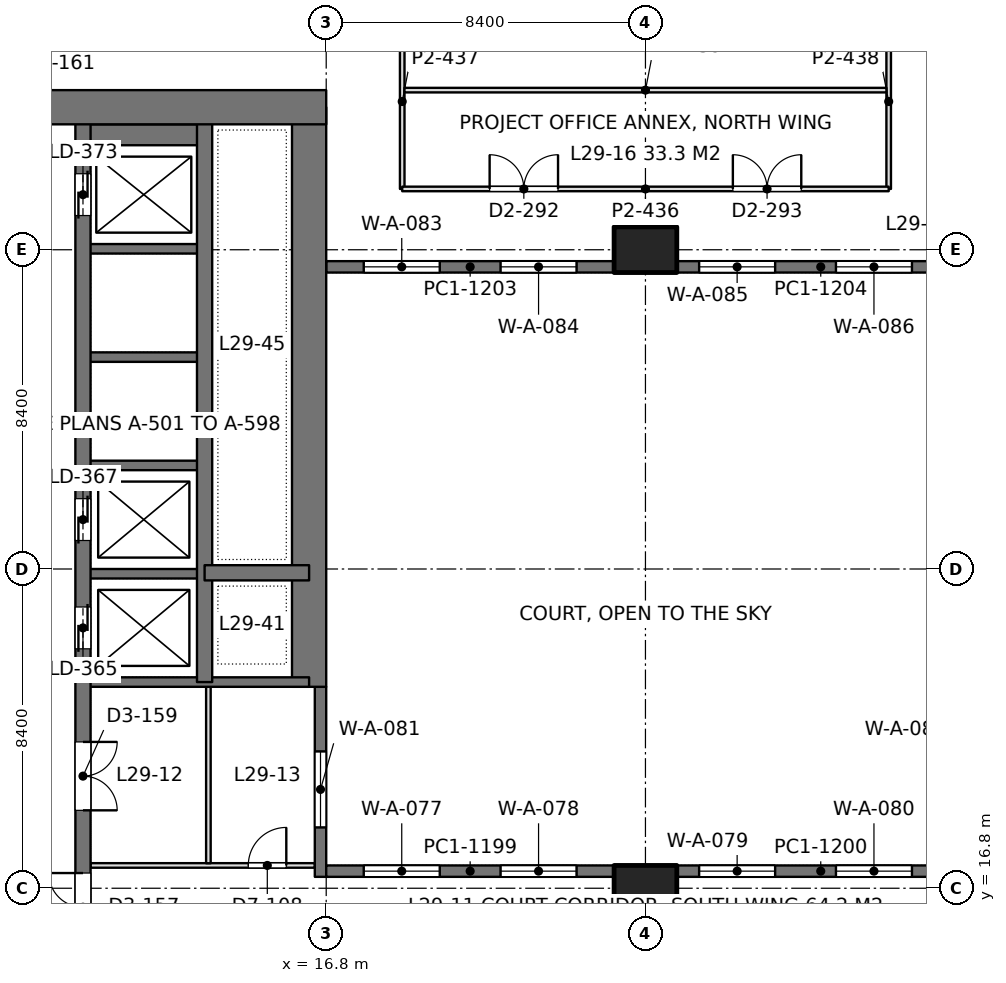
"""IFC4 building model, lengths in metres.
Left out: names, types, materials, properties, quantities, classifications, styles, units other than length and angle.
Written with IfcOpenShell. Run it as: python <this file> out.ifc"""

import sys

from ifc_helpers import new_model, si_unit, direction, frame, frame_2d, origin, origin_2d, place, context, subcontext, project, spatial, rectangle, extrude, element, fill, save


model = new_model("IFC4")
c1 = context("Model", 3, precision=1e-05, world=origin(), true_north=direction((0.0, 1.0)))
c2 = subcontext(c1, "Body", "Model", "MODEL_VIEW")
j1 = project(units=[si_unit("LENGTHUNIT", "METRE"), si_unit("PLANEANGLEUNIT", "RADIAN")], contexts=[c1])
p1 = place(None, origin())
s1 = spatial("IfcSite", under=j1, at=p1, CompositionType="ELEMENT")
p2 = place(p1, origin())
s2 = spatial("IfcBuilding", under=s1, at=p2, CompositionType="ELEMENT")
p3 = place(p2, frame((0.0, 0.0, 130.2)))
s3 = spatial("IfcBuildingStorey", under=s2, at=p3, CompositionType="ELEMENT", Elevation=130.2)
for number, where, z_axis, x_axis in (
    (1, (25.2, 16.8, 0.0), (0.0, 0.0, 1.0), (1.0, 0.0, 0.0)),
    (2, (25.2, 33.6, 0.0), (0.0, 0.0, 1.0), (1.0, 0.0, 0.0)),
):
    element("IfcColumn", number, at=place(p3, frame(where, z_axis=z_axis, x_axis=x_axis)), inside=s3, PredefinedType="COLUMN", context=c2, shape_type="SweptSolid", body=[
        extrude(rectangle(XDim=1.65, YDim=1.2, at=origin_2d()), origin(), (0.0, 0.0, 1.0), 4.2),
    ])
p4 = place(p3, frame((-1.2, 37.35, 0.0), z_axis=(0.0, 0.0, 1.0), x_axis=(1.0, 0.0, 0.0)))
e3 = element("IfcWall", 3, at=p4, inside=s3, PredefinedType="SHEAR", context=c2, shape_type="SweptSolid", body=[
    extrude(rectangle(XDim=18.0, YDim=0.9, at=frame_2d((9.0, 0.0))), origin(), (0.0, 0.0, 1.0), 4.2),
])
p5 = place(p4, frame((8.95, 0.0, 0.0)))
e4 = element("IfcOpeningElement", 4, at=p5, cuts=e3, PredefinedType="OPENING", context=c2, shape_type="SweptSolid", body=[
    extrude(rectangle(XDim=1.8, YDim=2.4, at=frame_2d((0.9, 1.2))), frame((0.0, 0.46, 0.0), z_axis=(0.0, -1.0, 0.0), x_axis=(1.0, 0.0, 0.0)), (0.0, 0.0, 1.0), 0.92),
])
p6 = place(p3, frame((16.35, 22.1, 0.0), z_axis=(0.0, 0.0, 1.0), x_axis=(0.0, 1.0, 0.0)))
e5 = element("IfcWall", 5, at=p6, inside=s3, PredefinedType="SHEAR", context=c2, shape_type="SweptSolid", body=[
    extrude(rectangle(XDim=15.25, YDim=0.9, at=frame_2d((7.625, 0.0))), origin(), (0.0, 0.0, 1.0), 4.2),
])
p7 = place(p3, frame((10.4, 13.05, 0.0), z_axis=(0.0, 0.0, 1.0), x_axis=(0.0, 1.0, 0.0)))
e6 = element("IfcWall", 6, at=p7, inside=s3, PredefinedType="SHEAR", context=c2, shape_type="SweptSolid", body=[
    extrude(rectangle(XDim=24.3, YDim=0.4, at=frame_2d((12.15, 0.0))), origin(), (0.0, 0.0, 1.0), 4.2),
])
p8 = place(p7, frame((10.05, 0.0, 0.0)))
e7 = element("IfcOpeningElement", 7, at=p8, cuts=e6, PredefinedType="OPENING", context=c2, shape_type="SweptSolid", body=[
    extrude(rectangle(XDim=1.1, YDim=2.2, at=frame_2d((0.55, 1.1))), frame((0.0, 0.21, 0.0), z_axis=(0.0, -1.0, 0.0), x_axis=(1.0, 0.0, 0.0)), (0.0, 0.0, 1.0), 0.42),
])
p9 = place(p7, frame((12.9, 0.0, 0.0)))
e8 = element("IfcOpeningElement", 8, at=p9, cuts=e6, PredefinedType="OPENING", context=c2, shape_type="SweptSolid", body=[
    extrude(rectangle(XDim=1.1, YDim=2.2, at=frame_2d((0.55, 1.1))), frame((0.0, 0.21, 0.0), z_axis=(0.0, -1.0, 0.0), x_axis=(1.0, 0.0, 0.0)), (0.0, 0.0, 1.0), 0.42),
])
p10 = place(p7, frame((21.45, 0.0, 0.0)))
e9 = element("IfcOpeningElement", 9, at=p10, cuts=e6, PredefinedType="OPENING", context=c2, shape_type="SweptSolid", body=[
    extrude(rectangle(XDim=1.1, YDim=2.2, at=frame_2d((0.55, 1.1))), frame((0.0, 0.21, 0.0), z_axis=(0.0, -1.0, 0.0), x_axis=(1.0, 0.0, 0.0)), (0.0, 0.0, 1.0), 0.42),
])
p11 = place(p7, frame((2.35, 0.0, 0.0)))
e10 = element("IfcOpeningElement", 10, at=p11, cuts=e6, PredefinedType="OPENING", context=c2, shape_type="SweptSolid", body=[
    extrude(rectangle(XDim=1.8, YDim=2.4, at=frame_2d((0.9, 1.2))), frame((0.0, 0.21, 0.0), z_axis=(0.0, -1.0, 0.0), x_axis=(1.0, 0.0, 0.0)), (0.0, 0.0, 1.0), 0.42),
])
p12 = place(p7, frame((5.8, 0.0, 0.0)))
e11 = element("IfcOpeningElement", 11, at=p12, cuts=e6, PredefinedType="OPENING", context=c2, shape_type="SweptSolid", body=[
    extrude(rectangle(XDim=1.8, YDim=2.4, at=frame_2d((0.9, 1.2))), frame((0.0, 0.21, 0.0), z_axis=(0.0, -1.0, 0.0), x_axis=(1.0, 0.0, 0.0)), (0.0, 0.0, 1.0), 0.42),
])
p13 = place(p3, frame((13.6, 22.225, 0.0), z_axis=(0.0, 0.0, 1.0), x_axis=(0.0, 1.0, 0.0)))
e12 = element("IfcWall", 12, at=p13, inside=s3, PredefinedType="SHEAR", context=c2, shape_type="SweptSolid", body=[
    extrude(rectangle(XDim=15.125, YDim=0.4, at=frame_2d((7.562, 0.0))), origin(), (0.0, 0.0, 1.0), 4.2),
])
p14 = place(p3, frame((13.6, 25.1, 0.0), z_axis=(0.0, 0.0, 1.0), x_axis=(1.0, 0.0, 0.0)))
e13 = element("IfcWall", 13, at=p14, inside=s3, PredefinedType="SHEAR", context=c2, shape_type="SweptSolid", body=[
    extrude(rectangle(XDim=2.75, YDim=0.4, at=frame_2d((1.375, 0.0))), origin(), (0.0, 0.0, 1.0), 4.2),
])
p15 = place(p3, frame((10.4, 22.225, 0.0), z_axis=(0.0, 0.0, 1.0), x_axis=(1.0, 0.0, 0.0)))
e14 = element("IfcWall", 14, at=p15, inside=s3, PredefinedType="SHEAR", context=c2, shape_type="SweptSolid", body=[
    extrude(rectangle(XDim=5.95, YDim=0.25, at=frame_2d((2.975, 0.0))), origin(), (0.0, 0.0, 1.0), 4.2),
])
for number, where, z_axis, x_axis in (
    (15, (10.4, 25.075, 0.0), (0.0, 0.0, 1.0), (1.0, 0.0, 0.0)),
    (16, (10.4, 27.925, 0.0), (0.0, 0.0, 1.0), (1.0, 0.0, 0.0)),
    (17, (10.4, 30.775, 0.0), (0.0, 0.0, 1.0), (1.0, 0.0, 0.0)),
    (18, (10.4, 33.625, 0.0), (0.0, 0.0, 1.0), (1.0, 0.0, 0.0)),
):
    element("IfcWall", number, at=place(p3, frame(where, z_axis=z_axis, x_axis=x_axis)), inside=s3, PredefinedType="SHEAR", context=c2, shape_type="SweptSolid", body=[
        extrude(rectangle(XDim=3.2, YDim=0.25, at=frame_2d((1.6, 0.0))), origin(), (0.0, 0.0, 1.0), 4.2),
    ])
p16 = place(p3, frame((10.4, 36.625, 0.0), z_axis=(0.0, 0.0, 1.0), x_axis=(1.0, 0.0, 0.0)))
e19 = element("IfcWall", 19, at=p16, inside=s3, PredefinedType="SHEAR", context=c2, shape_type="SweptSolid", body=[
    extrude(rectangle(XDim=3.2, YDim=0.55, at=frame_2d((1.6, 0.0))), origin(), (0.0, 0.0, 1.0), 4.2),
])
p17 = place(p3, frame((16.65, 17.1, 0.0), z_axis=(0.0, 0.0, 1.0), x_axis=(0.0, 1.0, 0.0)))
e20 = element("IfcWall", 20, at=p17, inside=s3, PredefinedType="SOLIDWALL", context=c2, shape_type="SweptSolid", body=[
    extrude(rectangle(XDim=5.0, YDim=0.3, at=frame_2d((2.5, 0.0))), origin(), (0.0, 0.0, 1.0), 4.05),
])
p18 = place(p17, frame((1.3, 0.0, 0.1)))
e21 = element("IfcOpeningElement", 21, at=p18, cuts=e20, PredefinedType="OPENING", context=c2, shape_type="SweptSolid", body=[
    extrude(rectangle(XDim=2.0, YDim=3.0, at=frame_2d((1.0, 1.5))), frame((0.0, 0.16, 0.0), z_axis=(0.0, -1.0, 0.0), x_axis=(1.0, 0.0, 0.0)), (0.0, 0.0, 1.0), 0.32),
])
p19 = place(p3, frame((16.8, 17.25, 0.0), z_axis=(0.0, 0.0, 1.0), x_axis=(1.0, 0.0, 0.0)))
e22 = element("IfcWall", 22, at=p19, inside=s3, PredefinedType="SOLIDWALL", context=c2, shape_type="SweptSolid", body=[
    extrude(rectangle(XDim=7.575, YDim=0.3, at=frame_2d((3.788, 0.0))), origin(), (0.0, 0.0, 1.0), 4.05),
])
p20 = place(p19, frame((0.988, 0.0, 0.1)))
e23 = element("IfcOpeningElement", 23, at=p20, cuts=e22, PredefinedType="OPENING", context=c2, shape_type="SweptSolid", body=[
    extrude(rectangle(XDim=2.0, YDim=3.0, at=frame_2d((1.0, 1.5))), frame((0.0, 0.16, 0.0), z_axis=(0.0, -1.0, 0.0), x_axis=(1.0, 0.0, 0.0)), (0.0, 0.0, 1.0), 0.32),
])
p21 = place(p19, frame((4.587, 0.0, 0.1)))
e24 = element("IfcOpeningElement", 24, at=p21, cuts=e22, PredefinedType="OPENING", context=c2, shape_type="SweptSolid", body=[
    extrude(rectangle(XDim=2.0, YDim=3.0, at=frame_2d((1.0, 1.5))), frame((0.0, 0.16, 0.0), z_axis=(0.0, -1.0, 0.0), x_axis=(1.0, 0.0, 0.0)), (0.0, 0.0, 1.0), 0.32),
])
p22 = place(p3, frame((26.025, 17.25, 0.0), z_axis=(0.0, 0.0, 1.0), x_axis=(1.0, 0.0, 0.0)))
e25 = element("IfcWall", 25, at=p22, inside=s3, PredefinedType="SOLIDWALL", context=c2, shape_type="SweptSolid", body=[
    extrude(rectangle(XDim=7.575, YDim=0.3, at=frame_2d((3.788, 0.0))), origin(), (0.0, 0.0, 1.0), 4.05),
])
p23 = place(p22, frame((0.587, 0.0, 0.1)))
e26 = element("IfcOpeningElement", 26, at=p23, cuts=e25, PredefinedType="OPENING", context=c2, shape_type="SweptSolid", body=[
    extrude(rectangle(XDim=2.0, YDim=3.0, at=frame_2d((1.0, 1.5))), frame((0.0, 0.16, 0.0), z_axis=(0.0, -1.0, 0.0), x_axis=(1.0, 0.0, 0.0)), (0.0, 0.0, 1.0), 0.32),
])
p24 = place(p22, frame((4.188, 0.0, 0.1)))
e27 = element("IfcOpeningElement", 27, at=p24, cuts=e25, PredefinedType="OPENING", context=c2, shape_type="SweptSolid", body=[
    extrude(rectangle(XDim=2.0, YDim=3.0, at=frame_2d((1.0, 1.5))), frame((0.0, 0.16, 0.0), z_axis=(0.0, -1.0, 0.0), x_axis=(1.0, 0.0, 0.0)), (0.0, 0.0, 1.0), 0.32),
])
p25 = place(p3, frame((16.8, 33.15, 0.0), z_axis=(0.0, 0.0, 1.0), x_axis=(1.0, 0.0, 0.0)))
e28 = element("IfcWall", 28, at=p25, inside=s3, PredefinedType="SOLIDWALL", context=c2, shape_type="SweptSolid", body=[
    extrude(rectangle(XDim=7.575, YDim=0.3, at=frame_2d((3.788, 0.0))), origin(), (0.0, 0.0, 1.0), 4.05),
])
p26 = place(p25, frame((0.988, 0.0, 0.1)))
e29 = element("IfcOpeningElement", 29, at=p26, cuts=e28, PredefinedType="OPENING", context=c2, shape_type="SweptSolid", body=[
    extrude(rectangle(XDim=2.0, YDim=3.0, at=frame_2d((1.0, 1.5))), frame((0.0, 0.16, 0.0), z_axis=(0.0, -1.0, 0.0), x_axis=(1.0, 0.0, 0.0)), (0.0, 0.0, 1.0), 0.32),
])
p27 = place(p25, frame((4.587, 0.0, 0.1)))
e30 = element("IfcOpeningElement", 30, at=p27, cuts=e28, PredefinedType="OPENING", context=c2, shape_type="SweptSolid", body=[
    extrude(rectangle(XDim=2.0, YDim=3.0, at=frame_2d((1.0, 1.5))), frame((0.0, 0.16, 0.0), z_axis=(0.0, -1.0, 0.0), x_axis=(1.0, 0.0, 0.0)), (0.0, 0.0, 1.0), 0.32),
])
p28 = place(p3, frame((26.025, 33.15, 0.0), z_axis=(0.0, 0.0, 1.0), x_axis=(1.0, 0.0, 0.0)))
e31 = element("IfcWall", 31, at=p28, inside=s3, PredefinedType="SOLIDWALL", context=c2, shape_type="SweptSolid", body=[
    extrude(rectangle(XDim=7.575, YDim=0.3, at=frame_2d((3.788, 0.0))), origin(), (0.0, 0.0, 1.0), 4.05),
])
p29 = place(p28, frame((0.587, 0.0, 0.1)))
e32 = element("IfcOpeningElement", 32, at=p29, cuts=e31, PredefinedType="OPENING", context=c2, shape_type="SweptSolid", body=[
    extrude(rectangle(XDim=2.0, YDim=3.0, at=frame_2d((1.0, 1.5))), frame((0.0, 0.16, 0.0), z_axis=(0.0, -1.0, 0.0), x_axis=(1.0, 0.0, 0.0)), (0.0, 0.0, 1.0), 0.32),
])
p30 = place(p28, frame((4.188, 0.0, 0.1)))
e33 = element("IfcOpeningElement", 33, at=p30, cuts=e31, PredefinedType="OPENING", context=c2, shape_type="SweptSolid", body=[
    extrude(rectangle(XDim=2.0, YDim=3.0, at=frame_2d((1.0, 1.5))), frame((0.0, 0.16, 0.0), z_axis=(0.0, -1.0, 0.0), x_axis=(1.0, 0.0, 0.0)), (0.0, 0.0, 1.0), 0.32),
])
p31 = place(p3, frame((10.598, 17.4, 0.0), z_axis=(0.0, 0.0, 1.0), x_axis=(1.0, 0.0, 0.0)))
e34 = element("IfcWall", 34, at=p31, inside=s3, PredefinedType="PARTITIONING", context=c2, shape_type="SweptSolid", body=[
    extrude(rectangle(XDim=5.904, YDim=0.12, at=frame_2d((2.952, 0.0))), origin(), (0.0, 0.0, 1.0), 3.55),
])
p32 = place(p31, frame((4.152, 0.0, 0.0)))
e35 = element("IfcOpeningElement", 35, at=p32, cuts=e34, PredefinedType="OPENING", context=c2, shape_type="SweptSolid", body=[
    extrude(rectangle(XDim=1.0, YDim=2.4, at=frame_2d((0.5, 1.2))), frame((0.0, 0.07, 0.0), z_axis=(0.0, -1.0, 0.0), x_axis=(1.0, 0.0, 0.0)), (0.0, 0.0, 1.0), 0.14),
])
p33 = place(p3, frame((13.7, 17.458, 0.0), z_axis=(0.0, 0.0, 1.0), x_axis=(0.0, 1.0, 0.0)))
e36 = element("IfcWall", 36, at=p33, inside=s3, PredefinedType="PARTITIONING", context=c2, shape_type="SweptSolid", body=[
    extrude(rectangle(XDim=4.644, YDim=0.12, at=frame_2d((2.322, 0.0))), origin(), (0.0, 0.0, 1.0), 3.6),
])
for number, where, z_axis, x_axis in (
    (37, (18.8, 35.2, 0.0), (0.0, 0.0, 1.0), (0.0, 1.0, 0.0)),
    (38, (31.6, 35.2, 0.0), (0.0, 0.0, 1.0), (0.0, 1.0, 0.0)),
):
    element("IfcWall", number, at=place(p3, frame(where, z_axis=z_axis, x_axis=x_axis)), inside=s3, PredefinedType="PARTITIONING", context=c2, shape_type="SweptSolid", body=[
        extrude(rectangle(XDim=4.6, YDim=0.12, at=frame_2d((2.3, 0.0))), origin(), (0.0, 0.0, 1.0), 4.05),
    ])
p34 = place(p3, frame((18.8, 35.2, 0.0), z_axis=(0.0, 0.0, 1.0), x_axis=(1.0, 0.0, 0.0)))
e39 = element("IfcWall", 39, at=p34, inside=s3, PredefinedType="PARTITIONING", context=c2, shape_type="SweptSolid", body=[
    extrude(rectangle(XDim=12.8, YDim=0.12, at=frame_2d((6.4, 0.0))), origin(), (0.0, 0.0, 1.0), 3.55),
])
p35 = place(p34, frame((2.3, 0.0, 0.0)))
e40 = element("IfcOpeningElement", 40, at=p35, cuts=e39, PredefinedType="OPENING", context=c2, shape_type="SweptSolid", body=[
    extrude(rectangle(XDim=1.8, YDim=2.2, at=frame_2d((0.9, 1.1))), frame((0.0, 0.07, 0.0), z_axis=(0.0, -1.0, 0.0), x_axis=(1.0, 0.0, 0.0)), (0.0, 0.0, 1.0), 0.14),
])
p36 = place(p34, frame((8.7, 0.0, 0.0)))
e41 = element("IfcOpeningElement", 41, at=p36, cuts=e39, PredefinedType="OPENING", context=c2, shape_type="SweptSolid", body=[
    extrude(rectangle(XDim=1.8, YDim=2.2, at=frame_2d((0.9, 1.1))), frame((0.0, 0.07, 0.0), z_axis=(0.0, -1.0, 0.0), x_axis=(1.0, 0.0, 0.0)), (0.0, 0.0, 1.0), 0.14),
])
p37 = place(p3, frame((18.858, 37.8, 0.0), z_axis=(0.0, 0.0, 1.0), x_axis=(1.0, 0.0, 0.0)))
e42 = element("IfcWall", 42, at=p37, inside=s3, PredefinedType="PARTITIONING", context=c2, shape_type="SweptSolid", body=[
    extrude(rectangle(XDim=12.684, YDim=0.12, at=frame_2d((6.342, 0.0))), origin(), (0.0, 0.0, 1.0), 3.55),
])
p38 = place(p18, origin())
e43 = element("IfcWindow", 43, at=p38, inside=s3, PartitioningType="SINGLE_PANEL", PredefinedType="WINDOW", context=c2, shape_type="SweptSolid", body=[
    extrude(rectangle(XDim=2.0, YDim=3.0, at=frame_2d((1.0, 1.5))), frame((0.0, 0.03, 0.0), z_axis=(0.0, -1.0, 0.0), x_axis=(1.0, 0.0, 0.0)), (0.0, 0.0, 1.0), 0.06),
])
fill(e21, e43)
p39 = place(p20, origin())
e44 = element("IfcWindow", 44, at=p39, inside=s3, PartitioningType="SINGLE_PANEL", PredefinedType="WINDOW", context=c2, shape_type="SweptSolid", body=[
    extrude(rectangle(XDim=2.0, YDim=3.0, at=frame_2d((1.0, 1.5))), frame((0.0, 0.03, 0.0), z_axis=(0.0, -1.0, 0.0), x_axis=(1.0, 0.0, 0.0)), (0.0, 0.0, 1.0), 0.06),
])
fill(e23, e44)
p40 = place(p21, origin())
e45 = element("IfcWindow", 45, at=p40, inside=s3, PartitioningType="SINGLE_PANEL", PredefinedType="WINDOW", context=c2, shape_type="SweptSolid", body=[
    extrude(rectangle(XDim=2.0, YDim=3.0, at=frame_2d((1.0, 1.5))), frame((0.0, 0.03, 0.0), z_axis=(0.0, -1.0, 0.0), x_axis=(1.0, 0.0, 0.0)), (0.0, 0.0, 1.0), 0.06),
])
fill(e24, e45)
p41 = place(p23, origin())
e46 = element("IfcWindow", 46, at=p41, inside=s3, PartitioningType="SINGLE_PANEL", PredefinedType="WINDOW", context=c2, shape_type="SweptSolid", body=[
    extrude(rectangle(XDim=2.0, YDim=3.0, at=frame_2d((1.0, 1.5))), frame((0.0, 0.03, 0.0), z_axis=(0.0, -1.0, 0.0), x_axis=(1.0, 0.0, 0.0)), (0.0, 0.0, 1.0), 0.06),
])
fill(e26, e46)
p42 = place(p24, origin())
e47 = element("IfcWindow", 47, at=p42, inside=s3, PartitioningType="SINGLE_PANEL", PredefinedType="WINDOW", context=c2, shape_type="SweptSolid", body=[
    extrude(rectangle(XDim=2.0, YDim=3.0, at=frame_2d((1.0, 1.5))), frame((0.0, 0.03, 0.0), z_axis=(0.0, -1.0, 0.0), x_axis=(1.0, 0.0, 0.0)), (0.0, 0.0, 1.0), 0.06),
])
fill(e27, e47)
p43 = place(p26, origin())
e48 = element("IfcWindow", 48, at=p43, inside=s3, PartitioningType="SINGLE_PANEL", PredefinedType="WINDOW", context=c2, shape_type="SweptSolid", body=[
    extrude(rectangle(XDim=2.0, YDim=3.0, at=frame_2d((1.0, 1.5))), frame((0.0, 0.03, 0.0), z_axis=(0.0, -1.0, 0.0), x_axis=(1.0, 0.0, 0.0)), (0.0, 0.0, 1.0), 0.06),
])
fill(e29, e48)
p44 = place(p27, origin())
e49 = element("IfcWindow", 49, at=p44, inside=s3, PartitioningType="SINGLE_PANEL", PredefinedType="WINDOW", context=c2, shape_type="SweptSolid", body=[
    extrude(rectangle(XDim=2.0, YDim=3.0, at=frame_2d((1.0, 1.5))), frame((0.0, 0.03, 0.0), z_axis=(0.0, -1.0, 0.0), x_axis=(1.0, 0.0, 0.0)), (0.0, 0.0, 1.0), 0.06),
])
fill(e30, e49)
p45 = place(p29, origin())
e50 = element("IfcWindow", 50, at=p45, inside=s3, PartitioningType="SINGLE_PANEL", PredefinedType="WINDOW", context=c2, shape_type="SweptSolid", body=[
    extrude(rectangle(XDim=2.0, YDim=3.0, at=frame_2d((1.0, 1.5))), frame((0.0, 0.03, 0.0), z_axis=(0.0, -1.0, 0.0), x_axis=(1.0, 0.0, 0.0)), (0.0, 0.0, 1.0), 0.06),
])
fill(e32, e50)
p46 = place(p30, origin())
e51 = element("IfcWindow", 51, at=p46, inside=s3, PartitioningType="SINGLE_PANEL", PredefinedType="WINDOW", context=c2, shape_type="SweptSolid", body=[
    extrude(rectangle(XDim=2.0, YDim=3.0, at=frame_2d((1.0, 1.5))), frame((0.0, 0.03, 0.0), z_axis=(0.0, -1.0, 0.0), x_axis=(1.0, 0.0, 0.0)), (0.0, 0.0, 1.0), 0.06),
])
fill(e33, e51)
p47 = place(p8, origin())
e52 = element("IfcDoor", 52, at=p47, inside=s3, OperationType="DOUBLE_DOOR_SLIDING", PredefinedType="DOOR", context=c2, shape_type="SweptSolid", body=[
    extrude(rectangle(XDim=1.1, YDim=2.2, at=frame_2d((0.55, 1.1))), frame((0.0, 0.025, 0.0), z_axis=(0.0, -1.0, 0.0), x_axis=(1.0, 0.0, 0.0)), (0.0, 0.0, 1.0), 0.05),
])
fill(e7, e52)
p48 = place(p9, origin())
e53 = element("IfcDoor", 53, at=p48, inside=s3, OperationType="DOUBLE_DOOR_SLIDING", PredefinedType="DOOR", context=c2, shape_type="SweptSolid", body=[
    extrude(rectangle(XDim=1.1, YDim=2.2, at=frame_2d((0.55, 1.1))), frame((0.0, 0.025, 0.0), z_axis=(0.0, -1.0, 0.0), x_axis=(1.0, 0.0, 0.0)), (0.0, 0.0, 1.0), 0.05),
])
fill(e8, e53)
p49 = place(p10, origin())
e54 = element("IfcDoor", 54, at=p49, inside=s3, OperationType="DOUBLE_DOOR_SLIDING", PredefinedType="DOOR", context=c2, shape_type="SweptSolid", body=[
    extrude(rectangle(XDim=1.1, YDim=2.2, at=frame_2d((0.55, 1.1))), frame((0.0, 0.025, 0.0), z_axis=(0.0, -1.0, 0.0), x_axis=(1.0, 0.0, 0.0)), (0.0, 0.0, 1.0), 0.05),
])
fill(e9, e54)
p50 = place(p11, origin())
e55 = element("IfcDoor", 55, at=p50, inside=s3, OperationType="DOUBLE_DOOR_SINGLE_SWING", PredefinedType="DOOR", context=c2, shape_type="SweptSolid", body=[
    extrude(rectangle(XDim=1.8, YDim=2.4, at=frame_2d((0.9, 1.2))), frame((0.0, 0.025, 0.0), z_axis=(0.0, -1.0, 0.0), x_axis=(1.0, 0.0, 0.0)), (0.0, 0.0, 1.0), 0.05),
])
fill(e10, e55)
p51 = place(p12, frame((1.8, 0.0, 0.0), z_axis=(0.0, 0.0, 1.0), x_axis=(-1.0, 0.0, 0.0)))
e56 = element("IfcDoor", 56, at=p51, inside=s3, OperationType="DOUBLE_DOOR_SINGLE_SWING", PredefinedType="DOOR", context=c2, shape_type="SweptSolid", body=[
    extrude(rectangle(XDim=1.8, YDim=2.4, at=frame_2d((0.9, 1.2))), frame((0.0, 0.025, 0.0), z_axis=(0.0, -1.0, 0.0), x_axis=(1.0, 0.0, 0.0)), (0.0, 0.0, 1.0), 0.05),
])
fill(e11, e56)
p52 = place(p32, origin())
e57 = element("IfcDoor", 57, at=p52, inside=s3, OperationType="SINGLE_SWING_RIGHT", PredefinedType="DOOR", context=c2, shape_type="SweptSolid", body=[
    extrude(rectangle(XDim=1.0, YDim=2.4, at=frame_2d((0.5, 1.2))), frame((0.0, 0.025, 0.0), z_axis=(0.0, -1.0, 0.0), x_axis=(1.0, 0.0, 0.0)), (0.0, 0.0, 1.0), 0.05),
])
fill(e35, e57)
p53 = place(p35, origin())
e58 = element("IfcDoor", 58, at=p53, inside=s3, OperationType="DOUBLE_DOOR_SINGLE_SWING", PredefinedType="DOOR", context=c2, shape_type="SweptSolid", body=[
    extrude(rectangle(XDim=1.8, YDim=2.2, at=frame_2d((0.9, 1.1))), frame((0.0, 0.025, 0.0), z_axis=(0.0, -1.0, 0.0), x_axis=(1.0, 0.0, 0.0)), (0.0, 0.0, 1.0), 0.05),
])
fill(e40, e58)
p54 = place(p36, origin())
e59 = element("IfcDoor", 59, at=p54, inside=s3, OperationType="DOUBLE_DOOR_SINGLE_SWING", PredefinedType="DOOR", context=c2, shape_type="SweptSolid", body=[
    extrude(rectangle(XDim=1.8, YDim=2.2, at=frame_2d((0.9, 1.1))), frame((0.0, 0.025, 0.0), z_axis=(0.0, -1.0, 0.0), x_axis=(1.0, 0.0, 0.0)), (0.0, 0.0, 1.0), 0.05),
])
fill(e41, e59)
save(model, sys.argv[1])
